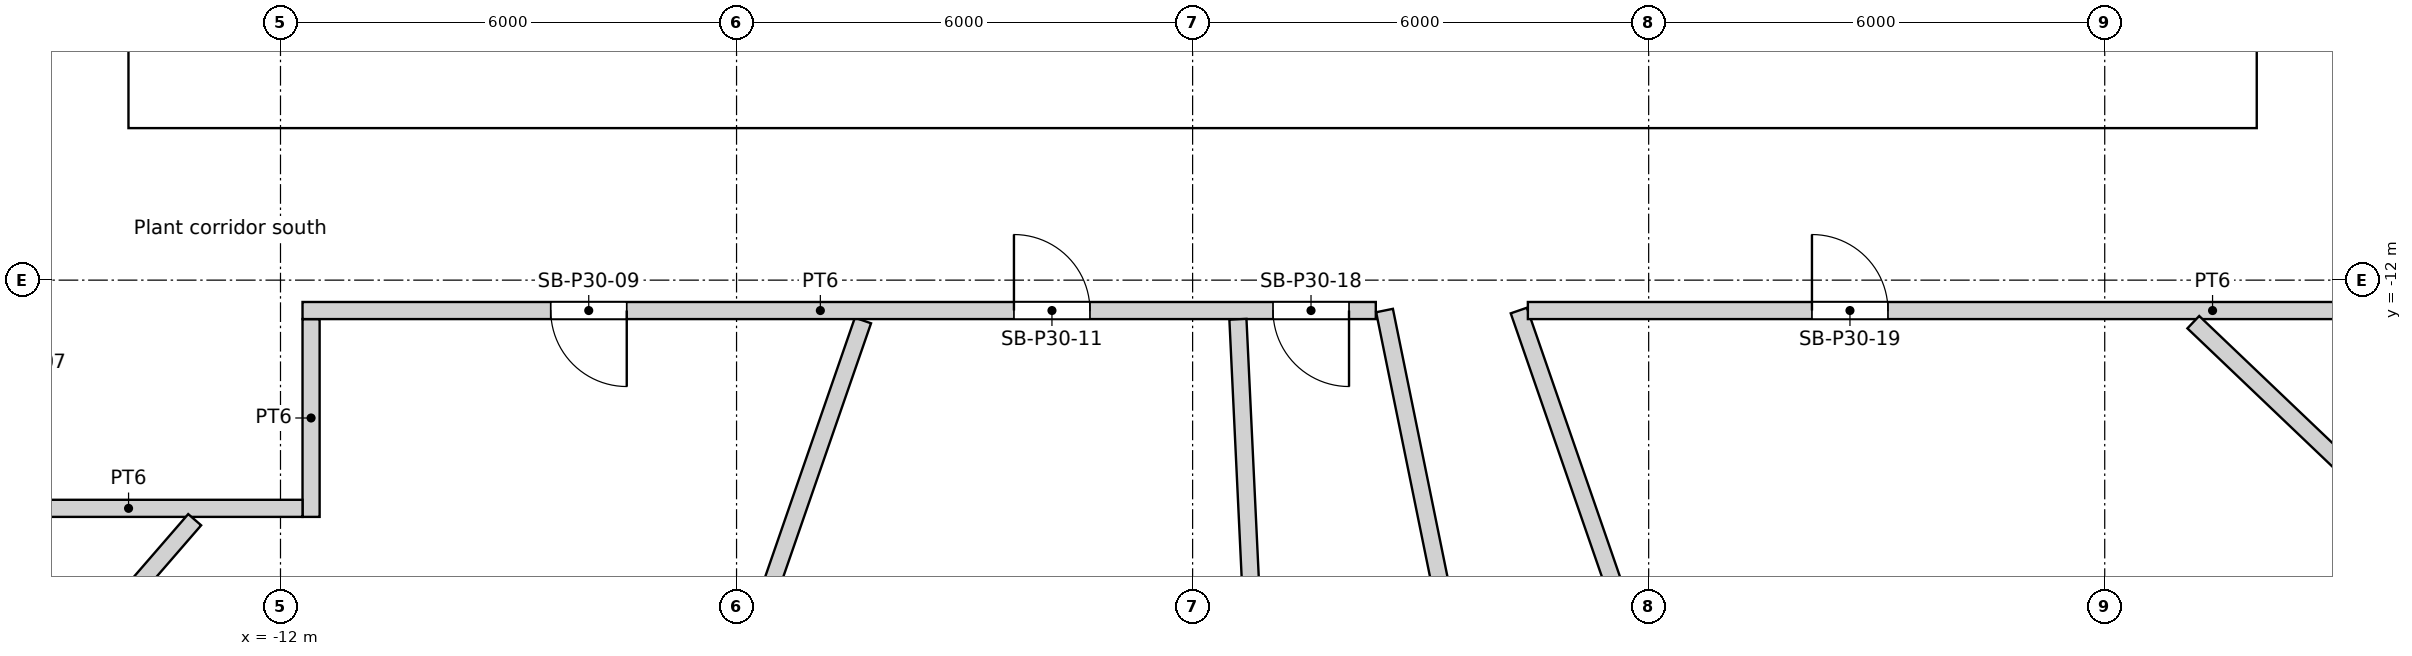
"""IFC4 building model, lengths in metres.
Left out: names, types, materials, properties, quantities, classifications, styles, units other than length and angle.
Written with IfcOpenShell. Run it as: python <this file> out.ifc"""

import sys

from ifc_helpers import new_model, si_unit, direction, frame, frame_2d, origin, origin_2d, place, context, subcontext, project, spatial, rectangle, circle, extrude, element, fill, save


model = new_model("IFC4")
c1 = context("Model", 3, precision=1e-05, world=origin(), true_north=direction((0.0, 1.0)))
c2 = subcontext(c1, "Body", "Model", "MODEL_VIEW")
j1 = project(units=[si_unit("LENGTHUNIT", "METRE"), si_unit("PLANEANGLEUNIT", "RADIAN")], contexts=[c1])
p1 = place(None, origin())
s1 = spatial("IfcSite", under=j1, at=p1, CompositionType="ELEMENT")
p2 = place(p1, origin())
s2 = spatial("IfcBuilding", under=s1, at=p2, CompositionType="ELEMENT")
p3 = place(p2, frame((0.0, 0.0, 120.0)))
s3 = spatial("IfcBuildingStorey", under=s2, at=p3, CompositionType="ELEMENT", Elevation=120.0)
for number, where, z_axis, x_axis in (
    (1, (-13.798, -12.802, 0.0), (0.0, 0.0, 1.0), (1.0, 0.0, 0.0)),
    (2, (-9.411, -16.301, 0.0), (0.0, 0.0, 1.0), (1.0, 0.0, 0.0)),
    (3, (11.735, -14.716, 0.0), (0.0, 0.0, 1.0), (1.0, 0.0, 0.0)),
    (4, (15.552, -10.603, 0.0), (0.0, 0.0, 1.0), (1.0, 0.0, 0.0)),
):
    element("IfcColumn", number, at=place(p3, frame(where, z_axis=z_axis, x_axis=x_axis)), inside=s3, PredefinedType="COLUMN", context=c2, shape_type="SweptSolid", body=[
        extrude(circle(Radius=0.7, at=origin_2d()), origin(), (0.0, 0.0, 1.0), 6.0),
    ])
p4 = place(p3, frame((-14.0, -9.4, 0.0), z_axis=(0.0, 0.0, 1.0), x_axis=(1.0, 0.0, 0.0)))
e5 = element("IfcWall", 5, at=p4, inside=s3, PredefinedType="SOLIDWALL", context=c2, shape_type="SweptSolid", body=[
    extrude(rectangle(XDim=28.0, YDim=1.2, at=frame_2d((14.0, 0.0))), origin(), (0.0, 0.0, 1.0), 5.7),
])
p5 = place(p4, frame((14.9, 0.0, 0.0)))
e6 = element("IfcOpeningElement", 6, at=p5, cuts=e5, PredefinedType="OPENING", context=c2, shape_type="SweptSolid", body=[
    extrude(rectangle(XDim=1.0, YDim=2.1, at=frame_2d((0.5, 1.05))), frame((0.0, 0.6, 0.0), z_axis=(0.0, -1.0, 0.0), x_axis=(1.0, 0.0, 0.0)), (0.0, 0.0, 1.0), 1.2),
])
p6 = place(p4, frame((9.8, 0.0, 0.0)))
e7 = element("IfcOpeningElement", 7, at=p6, cuts=e5, PredefinedType="OPENING", context=c2, shape_type="SweptSolid", body=[
    extrude(rectangle(XDim=1.8, YDim=2.1, at=frame_2d((0.9, 1.05))), frame((0.0, 0.6, 0.0), z_axis=(0.0, -1.0, 0.0), x_axis=(1.0, 0.0, 0.0)), (0.0, 0.0, 1.0), 1.2),
])
p7 = place(p4, frame((16.4, 0.0, 0.0)))
e8 = element("IfcOpeningElement", 8, at=p7, cuts=e5, PredefinedType="OPENING", context=c2, shape_type="SweptSolid", body=[
    extrude(rectangle(XDim=1.8, YDim=2.1, at=frame_2d((0.9, 1.05))), frame((0.0, 0.6, 0.0), z_axis=(0.0, -1.0, 0.0), x_axis=(1.0, 0.0, 0.0)), (0.0, 0.0, 1.0), 1.2),
])
p8 = place(p3, frame((-20.448, -23.598, 0.0), z_axis=(0.0, 0.0, 1.0), x_axis=(0.654864001214, 0.755746743237, 0.0)))
e9 = element("IfcWall", 9, at=p8, inside=s3, PredefinedType="PARTITIONING", context=c2, shape_type="SweptSolid", body=[
    extrude(rectangle(XDim=11.176, YDim=0.225, at=frame_2d((5.588, 0.0))), origin(), (0.0, 0.0, 1.0), 2.7),
])
p9 = place(p3, frame((-16.288, -15.002, 0.0), z_axis=(0.0, 0.0, 1.0), x_axis=(1.0, 0.0, 0.0)))
e10 = element("IfcWall", 10, at=p9, inside=s3, PredefinedType="PARTITIONING", context=c2, shape_type="SweptSolid", body=[
    extrude(rectangle(XDim=4.577, YDim=0.225, at=frame_2d((2.289, 0.0))), origin(), (0.0, 0.0, 1.0), 5.2),
])
p10 = place(p3, frame((-11.598, -15.115, 0.0), z_axis=(0.0, 0.0, 1.0), x_axis=(0.0, 1.0, 0.0)))
e11 = element("IfcWall", 11, at=p10, inside=s3, PredefinedType="PARTITIONING", context=c2, shape_type="SweptSolid", body=[
    extrude(rectangle(XDim=2.602, YDim=0.225, at=frame_2d((1.301, 0.0))), origin(), (0.0, 0.0, 1.0), 5.2),
])
p11 = place(p3, frame((-11.71, -12.4, 0.0), z_axis=(0.0, 0.0, 1.0), x_axis=(1.0, 0.0, 0.0)))
e12 = element("IfcWall", 12, at=p11, inside=s3, PredefinedType="PARTITIONING", context=c2, shape_type="SweptSolid", body=[
    extrude(rectangle(XDim=14.12, YDim=0.225, at=frame_2d((7.06, 0.0))), origin(), (0.0, 0.0, 1.0), 5.2),
])
p12 = place(p11, frame((3.265, 0.0, 0.0)))
e13 = element("IfcOpeningElement", 13, at=p12, cuts=e12, PredefinedType="OPENING", context=c2, shape_type="SweptSolid", body=[
    extrude(rectangle(XDim=1.0, YDim=2.1, at=frame_2d((0.5, 1.05))), frame((0.0, 0.113, 0.0), z_axis=(0.0, -1.0, 0.0), x_axis=(1.0, 0.0, 0.0)), (0.0, 0.0, 1.0), 0.225),
])
p13 = place(p11, frame((9.36, 0.0, 0.0)))
e14 = element("IfcOpeningElement", 14, at=p13, cuts=e12, PredefinedType="OPENING", context=c2, shape_type="SweptSolid", body=[
    extrude(rectangle(XDim=1.0, YDim=2.1, at=frame_2d((0.5, 1.05))), frame((0.0, 0.113, 0.0), z_axis=(0.0, -1.0, 0.0), x_axis=(1.0, 0.0, 0.0)), (0.0, 0.0, 1.0), 0.225),
])
p14 = place(p11, frame((12.768, 0.0, 0.0)))
e15 = element("IfcOpeningElement", 15, at=p14, cuts=e12, PredefinedType="OPENING", context=c2, shape_type="SweptSolid", body=[
    extrude(rectangle(XDim=1.0, YDim=2.1, at=frame_2d((0.5, 1.05))), frame((0.0, 0.113, 0.0), z_axis=(0.0, -1.0, 0.0), x_axis=(1.0, 0.0, 0.0)), (0.0, 0.0, 1.0), 0.225),
])
p15 = place(p3, frame((-10.212, -29.507, 0.0), z_axis=(0.0, 0.0, 1.0), x_axis=(0.32706855335, 0.945000614502, 0.0)))
e16 = element("IfcWall", 16, at=p15, inside=s3, PredefinedType="PARTITIONING", context=c2, shape_type="SweptSolid", body=[
    extrude(rectangle(XDim=17.964, YDim=0.225, at=frame_2d((8.982, 0.0))), origin(), (0.0, 0.0, 1.0), 5.2),
])
p16 = place(p3, frame((1.486, -31.189, 0.0), z_axis=(0.0, 0.0, 1.0), x_axis=(-0.047574456268, 0.998867694498, 0.0)))
e17 = element("IfcWall", 17, at=p16, inside=s3, PredefinedType="PARTITIONING", context=c2, shape_type="SweptSolid", body=[
    extrude(rectangle(XDim=18.695, YDim=0.225, at=frame_2d((9.348, 0.0))), origin(), (0.0, 0.0, 1.0), 2.7),
])
p17 = place(p3, frame((4.411, -12.4, 0.0), z_axis=(0.0, 0.0, 1.0), x_axis=(1.0, 0.0, 0.0)))
e18 = element("IfcWall", 18, at=p17, inside=s3, PredefinedType="PARTITIONING", context=c2, shape_type="SweptSolid", body=[
    extrude(rectangle(XDim=13.229, YDim=0.225, at=frame_2d((6.614, 0.0))), origin(), (0.0, 0.0, 1.0), 5.2),
])
p18 = place(p17, frame((3.738, 0.0, 0.0)))
e19 = element("IfcOpeningElement", 19, at=p18, cuts=e18, PredefinedType="OPENING", context=c2, shape_type="SweptSolid", body=[
    extrude(rectangle(XDim=1.0, YDim=2.1, at=frame_2d((0.5, 1.05))), frame((0.0, 0.113, 0.0), z_axis=(0.0, -1.0, 0.0), x_axis=(1.0, 0.0, 0.0)), (0.0, 0.0, 1.0), 0.225),
])
p19 = place(p3, frame((5.443, -26.729, 0.0), z_axis=(0.0, 0.0, 1.0), x_axis=(-0.199537394252, 0.979890212368, 0.0)))
e20 = element("IfcWall", 20, at=p19, inside=s3, PredefinedType="PARTITIONING", context=c2, shape_type="SweptSolid", body=[
    extrude(rectangle(XDim=14.624, YDim=0.225, at=frame_2d((7.312, 0.0))), origin(), (0.0, 0.0, 1.0), 5.2),
])
p20 = place(p3, frame((10.212, -29.507, 0.0), z_axis=(0.0, 0.0, 1.0), x_axis=(-0.327058221259, 0.945004190418, 0.0)))
e21 = element("IfcWall", 21, at=p20, inside=s3, PredefinedType="PARTITIONING", context=c2, shape_type="SweptSolid", body=[
    extrude(rectangle(XDim=18.103, YDim=0.225, at=frame_2d((9.051, 0.0))), origin(), (0.0, 0.0, 1.0), 5.2),
])
p21 = place(p3, frame((22.598, -21.547, 0.0), z_axis=(0.0, 0.0, 1.0), x_axis=(-0.72374624757, 0.690066206337, 0.0)))
e22 = element("IfcWall", 22, at=p21, inside=s3, PredefinedType="PARTITIONING", context=c2, shape_type="SweptSolid", body=[
    extrude(rectangle(XDim=13.033, YDim=0.225, at=frame_2d((6.517, 0.0))), origin(), (0.0, 0.0, 1.0), 2.7),
])
p22 = place(p5, origin())
e23 = element("IfcDoor", 23, at=p22, inside=s3, OperationType="SINGLE_SWING_LEFT", PredefinedType="DOOR", context=c2, shape_type="SweptSolid", body=[
    extrude(rectangle(XDim=1.0, YDim=2.1, at=frame_2d((0.5, 1.05))), frame((0.0, 0.025, 0.0), z_axis=(0.0, -1.0, 0.0), x_axis=(1.0, 0.0, 0.0)), (0.0, 0.0, 1.0), 0.05),
])
fill(e6, e23)
p23 = place(p6, origin())
e24 = element("IfcDoor", 24, at=p23, inside=s3, OperationType="DOUBLE_DOOR_SINGLE_SWING", PredefinedType="DOOR", context=c2, shape_type="SweptSolid", body=[
    extrude(rectangle(XDim=1.8, YDim=2.1, at=frame_2d((0.9, 1.05))), frame((0.0, 0.025, 0.0), z_axis=(0.0, -1.0, 0.0), x_axis=(1.0, 0.0, 0.0)), (0.0, 0.0, 1.0), 0.05),
])
fill(e7, e24)
p24 = place(p7, origin())
e25 = element("IfcDoor", 25, at=p24, inside=s3, OperationType="DOUBLE_DOOR_SINGLE_SWING", PredefinedType="DOOR", context=c2, shape_type="SweptSolid", body=[
    extrude(rectangle(XDim=1.8, YDim=2.1, at=frame_2d((0.9, 1.05))), frame((0.0, 0.025, 0.0), z_axis=(0.0, -1.0, 0.0), x_axis=(1.0, 0.0, 0.0)), (0.0, 0.0, 1.0), 0.05),
])
fill(e8, e25)
p25 = place(p12, origin())
e26 = element("IfcDoor", 26, at=p25, inside=s3, OperationType="SINGLE_SWING_LEFT", PredefinedType="DOOR", context=c2, shape_type="SweptSolid", body=[
    extrude(rectangle(XDim=1.0, YDim=2.1, at=frame_2d((0.5, 1.05))), frame((0.0, 0.025, 0.0), z_axis=(0.0, -1.0, 0.0), x_axis=(1.0, 0.0, 0.0)), (0.0, 0.0, 1.0), 0.05),
])
fill(e13, e26)
p26 = place(p13, origin())
e27 = element("IfcDoor", 27, at=p26, inside=s3, OperationType="SINGLE_SWING_LEFT", PredefinedType="DOOR", context=c2, shape_type="SweptSolid", body=[
    extrude(rectangle(XDim=1.0, YDim=2.1, at=frame_2d((0.5, 1.05))), frame((0.0, 0.025, 0.0), z_axis=(0.0, -1.0, 0.0), x_axis=(1.0, 0.0, 0.0)), (0.0, 0.0, 1.0), 0.05),
])
fill(e14, e27)
p27 = place(p14, origin())
e28 = element("IfcDoor", 28, at=p27, inside=s3, OperationType="SINGLE_SWING_LEFT", PredefinedType="DOOR", context=c2, shape_type="SweptSolid", body=[
    extrude(rectangle(XDim=1.0, YDim=2.1, at=frame_2d((0.5, 1.05))), frame((0.0, 0.025, 0.0), z_axis=(0.0, -1.0, 0.0), x_axis=(1.0, 0.0, 0.0)), (0.0, 0.0, 1.0), 0.05),
])
fill(e15, e28)
p28 = place(p18, origin())
e29 = element("IfcDoor", 29, at=p28, inside=s3, OperationType="SINGLE_SWING_LEFT", PredefinedType="DOOR", context=c2, shape_type="SweptSolid", body=[
    extrude(rectangle(XDim=1.0, YDim=2.1, at=frame_2d((0.5, 1.05))), frame((0.0, 0.025, 0.0), z_axis=(0.0, -1.0, 0.0), x_axis=(1.0, 0.0, 0.0)), (0.0, 0.0, 1.0), 0.05),
])
fill(e19, e29)
save(model, sys.argv[1])
